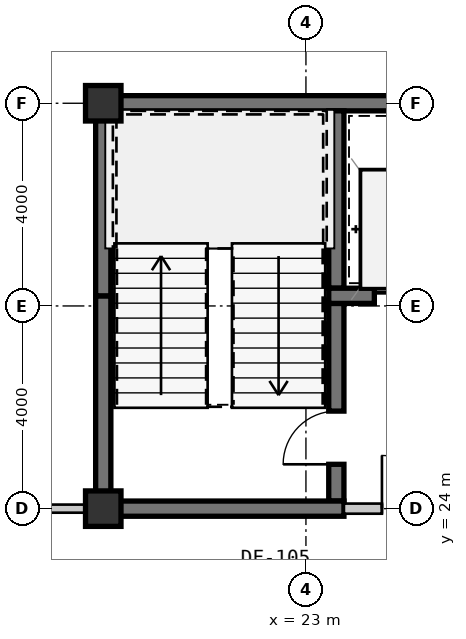
"""IFC4 building model, lengths in metres.
Left out: names, types, materials, properties, quantities, classifications, styles, units other than length and angle.
Written with IfcOpenShell. Run it as: python <this file> out.ifc"""

import sys

from ifc_helpers import new_model, si_unit, direction, frame, frame_2d, origin, origin_2d, place, context, subcontext, project, spatial, rectangle, extrude, source, transform, mapped, element, fill, save


model = new_model("IFC4")
c1 = context("Model", 3, precision=1e-05, world=origin(), true_north=direction((0.0, 1.0)))
c2 = subcontext(c1, "Body", "Model", "MODEL_VIEW")
j1 = project(units=[si_unit("LENGTHUNIT", "METRE"), si_unit("PLANEANGLEUNIT", "RADIAN")], contexts=[c1])
p1 = place(None, origin())
s1 = spatial("IfcSite", under=j1, at=p1, CompositionType="ELEMENT")
p2 = place(p1, origin())
s2 = spatial("IfcBuilding", under=s1, at=p2, CompositionType="ELEMENT")
p3 = place(p2, frame((0.0, 0.0, 65.1)))
s3 = spatial("IfcBuildingStorey", under=s2, at=p3, CompositionType="ELEMENT", Elevation=65.1)
m1 = source(origin(), c2, "Body", "SweptSolid", [
    extrude(rectangle(XDim=0.7, YDim=0.7, at=origin_2d()), origin(), (0.0, 0.0, 1.0), 3.15),
])
for number, where, z_axis, x_axis in (
    (1, (19.0, 24.0, 0.0), (0.0, 0.0, 1.0), (1.0, 0.0, 0.0)),
    (2, (19.0, 32.0, 0.0), (0.0, 0.0, 1.0), (1.0, 0.0, 0.0)),
):
    element("IfcColumn", number, at=place(p3, frame(where, z_axis=z_axis, x_axis=x_axis)), inside=s3, PredefinedType="COLUMN", context=c2, shape_type="MappedRepresentation", body=[
        mapped(m1, transform((0.0, 0.0, 0.0), scale=1.0)),
    ])
m2 = source(origin(), c2, "Body", "SweptSolid", [
    extrude(rectangle(XDim=9.15, YDim=0.3, at=frame_2d((4.575, 0.0))), origin(), (0.0, 0.0, 1.0), 2.93),
])
p4 = place(p3, frame((18.85, 32.0, 0.0), z_axis=(0.0, 0.0, 1.0), x_axis=(1.0, 0.0, 0.0)))
e3 = element("IfcWall", 3, at=p4, inside=s3, PredefinedType="SHEAR", context=c2, shape_type="MappedRepresentation", body=[
    mapped(m2, transform((0.0, 0.0, 0.0), scale=1.0)),
])
m3 = source(origin(), c2, "Body", "SweptSolid", [
    extrude(rectangle(XDim=4.05, YDim=0.3, at=frame_2d((2.025, 0.0))), origin(), (0.0, 0.0, 1.0), 2.93),
])
p5 = place(p3, frame((19.0, 24.15, 0.0), z_axis=(0.0, 0.0, 1.0), x_axis=(0.0, 1.0, 0.0)))
e4 = element("IfcWall", 4, at=p5, inside=s3, PredefinedType="SHEAR", context=c2, shape_type="MappedRepresentation", body=[
    mapped(m3, transform((0.0, 0.0, 0.0), scale=1.0)),
])
m4 = source(origin(), c2, "Body", "SweptSolid", [
    extrude(rectangle(XDim=3.65, YDim=0.3, at=frame_2d((1.825, 0.0))), origin(), (0.0, 0.0, 1.0), 2.93),
])
p6 = place(p3, frame((19.0, 28.2, 0.0), z_axis=(0.0, 0.0, 1.0), x_axis=(0.0, 1.0, 0.0)))
e5 = element("IfcWall", 5, at=p6, inside=s3, PredefinedType="SHEAR", context=c2, shape_type="MappedRepresentation", body=[
    mapped(m4, transform((0.0, 0.0, 0.0), scale=1.0)),
])
m5 = source(origin(), c2, "Body", "SweptSolid", [
    extrude(rectangle(XDim=3.5, YDim=0.3, at=frame_2d((1.75, 0.0))), origin(), (0.0, 0.0, 1.0), 2.93),
])
p7 = place(p3, frame((23.6, 28.35, 0.0), z_axis=(0.0, 0.0, 1.0), x_axis=(0.0, 1.0, 0.0)))
e6 = element("IfcWall", 6, at=p7, inside=s3, PredefinedType="SHEAR", context=c2, shape_type="MappedRepresentation", body=[
    mapped(m5, transform((0.0, 0.0, 0.0), scale=1.0)),
])
m6 = source(origin(), c2, "Body", "SweptSolid", [
    extrude(rectangle(XDim=3.9, YDim=0.3, at=frame_2d((1.95, 0.0))), origin(), (0.0, 0.0, 1.0), 2.93),
])
p8 = place(p3, frame((23.6, 24.15, 0.0), z_axis=(0.0, 0.0, 1.0), x_axis=(0.0, 1.0, 0.0)))
e7 = element("IfcWall", 7, at=p8, inside=s3, PredefinedType="SHEAR", context=c2, shape_type="MappedRepresentation", body=[
    mapped(m6, transform((0.0, 0.0, 0.0), scale=1.0)),
])
m7 = source(origin(), c2, "Body", "SweptSolid", [
    extrude(rectangle(XDim=1.05, YDim=2.1, at=frame_2d((0.525, 1.05))), frame((0.0, 0.16, 0.0), z_axis=(0.0, -1.0, 0.0), x_axis=(1.0, 0.0, 0.0)), (0.0, 0.0, 1.0), 0.32),
])
p9 = place(p8, frame((0.725, 0.0, 0.0)))
e8 = element("IfcOpeningElement", 8, at=p9, cuts=e7, PredefinedType="OPENING", context=c2, shape_type="MappedRepresentation", body=[
    mapped(m7, transform((0.0, 0.0, 0.0), scale=1.0)),
])
m8 = source(origin(), c2, "Body", "SweptSolid", [
    extrude(rectangle(XDim=4.9, YDim=0.3, at=frame_2d((2.45, 0.0))), origin(), (0.0, 0.0, 1.0), 2.93),
])
p10 = place(p3, frame((18.85, 24.0, 0.0), z_axis=(0.0, 0.0, 1.0), x_axis=(1.0, 0.0, 0.0)))
e9 = element("IfcWall", 9, at=p10, inside=s3, PredefinedType="SHEAR", context=c2, shape_type="MappedRepresentation", body=[
    mapped(m8, transform((0.0, 0.0, 0.0), scale=1.0)),
])
m9 = source(origin(), c2, "Body", "SweptSolid", [
    extrude(rectangle(XDim=2.9, YDim=0.3, at=frame_2d((1.45, 0.0))), origin(), (0.0, 0.0, 1.0), 2.93),
])
p11 = place(p3, frame((23.45, 28.2, 0.0), z_axis=(0.0, 0.0, 1.0), x_axis=(1.0, 0.0, 0.0)))
e10 = element("IfcWall", 10, at=p11, inside=s3, PredefinedType="SHEAR", context=c2, shape_type="MappedRepresentation", body=[
    mapped(m9, transform((0.0, 0.0, 0.0), scale=1.0)),
])
m10 = source(origin(), c2, "Body", "SweptSolid", [
    extrude(rectangle(XDim=1.1, YDim=2.15, at=frame_2d((0.55, 1.075))), frame((0.0, 0.16, 0.0), z_axis=(0.0, -1.0, 0.0), x_axis=(1.0, 0.0, 0.0)), (0.0, 0.0, 1.0), 0.32),
])
p12 = place(p11, frame((0.9, 0.0, 0.0)))
e11 = element("IfcOpeningElement", 11, at=p12, cuts=e10, PredefinedType="OPENING", context=c2, shape_type="MappedRepresentation", body=[
    mapped(m10, transform((0.0, 0.0, 0.0), scale=1.0)),
])
m11 = source(origin(), c2, "Body", "SweptSolid", [
    extrude(rectangle(XDim=2.7, YDim=0.2, at=frame_2d((1.35, 0.0))), origin(), (0.0, 0.0, 1.0), 2.47),
])
p13 = place(p3, frame((23.75, 24.0, 0.0), z_axis=(0.0, 0.0, 1.0), x_axis=(1.0, 0.0, 0.0)))
e12 = element("IfcWall", 12, at=p13, inside=s3, PredefinedType="SOLIDWALL", context=c2, shape_type="MappedRepresentation", body=[
    mapped(m11, transform((0.0, 0.0, 0.0), scale=1.0)),
])
m12 = source(origin(), c2, "Body", "SweptSolid", [
    extrude(rectangle(XDim=1.05, YDim=2.1, at=frame_2d((0.525, 1.05))), frame((0.0, 0.11, 0.0), z_axis=(0.0, -1.0, 0.0), x_axis=(1.0, 0.0, 0.0)), (0.0, 0.0, 1.0), 0.22),
])
p14 = place(p13, frame((0.75, 0.0, 0.0)))
e13 = element("IfcOpeningElement", 13, at=p14, cuts=e12, PredefinedType="OPENING", context=c2, shape_type="MappedRepresentation", body=[
    mapped(m12, transform((0.0, 0.0, 0.0), scale=1.0)),
])
m13 = source(origin(), c2, "Body", "SweptSolid", [
    extrude(rectangle(XDim=4.17, YDim=0.16, at=frame_2d((2.085, 0.0))), origin(), (0.0, 0.0, 1.0), 2.93),
])
p15 = place(p3, frame((14.68, 24.0, 0.0), z_axis=(0.0, 0.0, 1.0), x_axis=(1.0, 0.0, 0.0)))
e14 = element("IfcWall", 14, at=p15, inside=s3, PredefinedType="PARTITIONING", context=c2, shape_type="MappedRepresentation", body=[
    mapped(m13, transform((0.0, 0.0, 0.0), scale=1.0)),
])
m14 = source(origin(), c2, "Body", "SweptSolid", [
    extrude(rectangle(XDim=0.92, YDim=2.1, at=frame_2d((0.46, 1.05))), frame((0.0, 0.09, 0.0), z_axis=(0.0, -1.0, 0.0), x_axis=(1.0, 0.0, 0.0)), (0.0, 0.0, 1.0), 0.18),
])
p16 = place(p15, frame((1.69, 0.0, 0.0)))
e15 = element("IfcOpeningElement", 15, at=p16, cuts=e14, PredefinedType="OPENING", context=c2, shape_type="MappedRepresentation", body=[
    mapped(m14, transform((0.0, 0.0, 0.0), scale=1.0)),
])
m15 = source(origin(), c2, "Body", "SweptSolid", [
    extrude(rectangle(XDim=1.05, YDim=2.1, at=frame_2d((0.525, 1.05))), frame((0.0, 0.025, 0.0), z_axis=(0.0, -1.0, 0.0), x_axis=(1.0, 0.0, 0.0)), (0.0, 0.0, 1.0), 0.05),
])
p17 = place(p9, origin())
e16 = element("IfcDoor", 16, at=p17, inside=s3, OperationType="SINGLE_SWING_LEFT", PredefinedType="DOOR", context=c2, shape_type="MappedRepresentation", body=[
    mapped(m15, transform((0.0, 0.0, 0.0), scale=1.0)),
])
fill(e8, e16)
m16 = source(origin(), c2, "Body", "SweptSolid", [
    extrude(rectangle(XDim=1.1, YDim=2.15, at=frame_2d((0.55, 1.075))), frame((0.0, 0.025, 0.0), z_axis=(0.0, -1.0, 0.0), x_axis=(1.0, 0.0, 0.0)), (0.0, 0.0, 1.0), 0.05),
])
p18 = place(p12, origin())
e17 = element("IfcDoor", 17, at=p18, inside=s3, OperationType="SLIDING_TO_LEFT", PredefinedType="DOOR", context=c2, shape_type="MappedRepresentation", body=[
    mapped(m16, transform((0.0, 0.0, 0.0), scale=1.0)),
])
fill(e11, e17)
p19 = place(p14, origin())
e18 = element("IfcDoor", 18, at=p19, inside=s3, OperationType="SINGLE_SWING_LEFT", PredefinedType="DOOR", context=c2, shape_type="MappedRepresentation", body=[
    mapped(m15, transform((0.0, 0.0, 0.0), scale=1.0)),
])
fill(e13, e18)
save(model, sys.argv[1])
